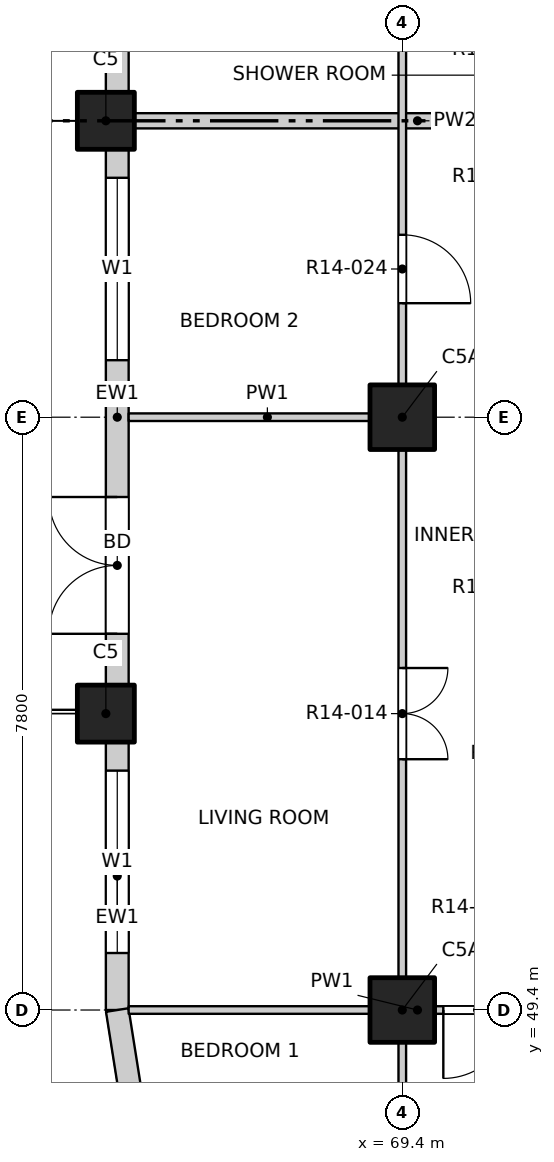
"""IFC4 building model, lengths in metres.
Left out: names, types, materials, properties, quantities, classifications, styles, units other than length and angle.
Written with IfcOpenShell. Run it as: python <this file> out.ifc"""

import sys

from ifc_helpers import new_model, si_unit, direction, frame, frame_2d, origin, origin_2d, place, context, subcontext, project, spatial, rectangle, extrude, element, fill, save


model = new_model("IFC4")
c1 = context("Model", 3, precision=1e-05, world=origin(), true_north=direction((0.0, 1.0)))
c2 = subcontext(c1, "Body", "Model", "MODEL_VIEW")
j1 = project(units=[si_unit("LENGTHUNIT", "METRE"), si_unit("PLANEANGLEUNIT", "RADIAN")], contexts=[c1])
p1 = place(None, origin())
s1 = spatial("IfcSite", under=j1, at=p1, CompositionType="ELEMENT")
p2 = place(p1, origin())
s2 = spatial("IfcBuilding", under=s1, at=p2, CompositionType="ELEMENT")
p3 = place(p2, frame((0.0, 0.0, 148.6)))
s3 = spatial("IfcBuildingStorey", under=s2, at=p3, CompositionType="ELEMENT", Elevation=148.6)
for number, where, z_axis, x_axis in (
    (1, (65.5, 53.3, -0.3), (0.0, 0.0, 1.0), (1.0, 0.0, 0.0)),
    (2, (65.5, 61.1, -0.3), (0.0, 0.0, 1.0), (1.0, 0.0, 0.0)),
):
    element("IfcColumn", number, at=place(p3, frame(where, z_axis=z_axis, x_axis=x_axis)), inside=s3, PredefinedType="COLUMN", context=c2, shape_type="SweptSolid", body=[
        extrude(rectangle(XDim=0.75, YDim=0.75, at=origin_2d()), origin(), (0.0, 0.0, 1.0), 3.45),
    ])
for number, where, z_axis, x_axis in (
    (3, (69.4, 49.4, -0.3), (0.0, 0.0, 1.0), (1.0, 0.0, 0.0)),
    (4, (69.4, 57.2, -0.3), (0.0, 0.0, 1.0), (1.0, 0.0, 0.0)),
):
    element("IfcColumn", number, at=place(p3, frame(where, z_axis=z_axis, x_axis=x_axis)), inside=s3, PredefinedType="COLUMN", context=c2, shape_type="SweptSolid", body=[
        extrude(rectangle(XDim=0.85, YDim=0.85, at=origin_2d()), origin(), (0.0, 0.0, 1.0), 3.45),
    ])
p4 = place(p3, frame((65.65, 49.4, 0.0), z_axis=(0.0, 0.0, 1.0), x_axis=(0.0, 1.0, 0.0)))
e5 = element("IfcWall", 5, at=p4, inside=s3, PredefinedType="SOLIDWALL", context=c2, shape_type="SweptSolid", body=[
    extrude(rectangle(XDim=3.525, YDim=0.3, at=frame_2d((1.763, 0.0))), origin(), (0.0, 0.0, 1.0), 2.7),
])
p5 = place(p4, frame((0.75, 0.0, 0.9)))
e6 = element("IfcOpeningElement", 6, at=p5, cuts=e5, PredefinedType="OPENING", context=c2, shape_type="SweptSolid", body=[
    extrude(rectangle(XDim=2.4, YDim=1.8, at=frame_2d((1.2, 0.9))), frame((0.0, 0.16, 0.0), z_axis=(0.0, -1.0, 0.0), x_axis=(1.0, 0.0, 0.0)), (0.0, 0.0, 1.0), 0.32),
])
p6 = place(p3, frame((65.65, 53.675, 0.0), z_axis=(0.0, 0.0, 1.0), x_axis=(0.0, 1.0, 0.0)))
e7 = element("IfcWall", 7, at=p6, inside=s3, PredefinedType="SOLIDWALL", context=c2, shape_type="SweptSolid", body=[
    extrude(rectangle(XDim=7.05, YDim=0.3, at=frame_2d((3.525, 0.0))), origin(), (0.0, 0.0, 1.0), 2.7),
])
p7 = place(p6, frame((0.675, 0.0, 0.0)))
e8 = element("IfcOpeningElement", 8, at=p7, cuts=e7, PredefinedType="OPENING", context=c2, shape_type="SweptSolid", body=[
    extrude(rectangle(XDim=1.8, YDim=2.4, at=frame_2d((0.9, 1.2))), frame((0.0, 0.16, 0.0), z_axis=(0.0, -1.0, 0.0), x_axis=(1.0, 0.0, 0.0)), (0.0, 0.0, 1.0), 0.32),
])
p8 = place(p6, frame((4.275, 0.0, 0.9)))
e9 = element("IfcOpeningElement", 9, at=p8, cuts=e7, PredefinedType="OPENING", context=c2, shape_type="SweptSolid", body=[
    extrude(rectangle(XDim=2.4, YDim=1.8, at=frame_2d((1.2, 0.9))), frame((0.0, 0.16, 0.0), z_axis=(0.0, -1.0, 0.0), x_axis=(1.0, 0.0, 0.0)), (0.0, 0.0, 1.0), 0.32),
])
p9 = place(p3, frame((65.65, 61.475, 0.0), z_axis=(0.0, 0.0, 1.0), x_axis=(0.0, 1.0, 0.0)))
e10 = element("IfcWall", 10, at=p9, inside=s3, PredefinedType="SOLIDWALL", context=c2, shape_type="SweptSolid", body=[
    extrude(rectangle(XDim=7.05, YDim=0.3, at=frame_2d((3.525, 0.0))), origin(), (0.0, 0.0, 1.0), 2.7),
])
p10 = place(p9, frame((0.675, 0.0, 0.0)))
e11 = element("IfcOpeningElement", 11, at=p10, cuts=e10, PredefinedType="OPENING", context=c2, shape_type="SweptSolid", body=[
    extrude(rectangle(XDim=1.8, YDim=2.4, at=frame_2d((0.9, 1.2))), frame((0.0, 0.16, 0.0), z_axis=(0.0, -1.0, 0.0), x_axis=(1.0, 0.0, 0.0)), (0.0, 0.0, 1.0), 0.32),
])
p11 = place(p9, frame((4.275, 0.0, 0.9)))
e12 = element("IfcOpeningElement", 12, at=p11, cuts=e10, PredefinedType="OPENING", context=c2, shape_type="SweptSolid", body=[
    extrude(rectangle(XDim=2.4, YDim=1.8, at=frame_2d((1.2, 0.9))), frame((0.0, 0.16, 0.0), z_axis=(0.0, -1.0, 0.0), x_axis=(1.0, 0.0, 0.0)), (0.0, 0.0, 1.0), 0.32),
])
p12 = place(p3, frame((65.65, 49.4, 0.0), z_axis=(0.0, 0.0, 1.0), x_axis=(0.156496880861, -0.987678452879, 0.0)))
e13 = element("IfcWall", 13, at=p12, inside=s3, PredefinedType="SOLIDWALL", context=c2, shape_type="SweptSolid", body=[
    extrude(rectangle(XDim=1.173, YDim=0.3, at=frame_2d((0.586, 0.0))), origin(), (0.0, 0.0, 1.0), 2.7),
])
p13 = place(p3, frame((65.8, 49.4, 0.0), z_axis=(0.0, 0.0, 1.0), x_axis=(1.0, 0.0, 0.0)))
e14 = element("IfcWall", 14, at=p13, inside=s3, PredefinedType="PARTITIONING", context=c2, shape_type="SweptSolid", body=[
    extrude(rectangle(XDim=7.6, YDim=0.1, at=frame_2d((3.8, 0.0))), origin(), (0.0, 0.0, 1.0), 3.15),
])
p14 = place(p13, frame((4.14, 0.0, 0.0)))
e15 = element("IfcOpeningElement", 15, at=p14, cuts=e14, PredefinedType="OPENING", context=c2, shape_type="SweptSolid", body=[
    extrude(rectangle(XDim=0.9, YDim=2.1, at=frame_2d((0.45, 1.05))), frame((0.0, 0.06, 0.0), z_axis=(0.0, -1.0, 0.0), x_axis=(1.0, 0.0, 0.0)), (0.0, 0.0, 1.0), 0.12),
])
p15 = place(p3, frame((65.8, 57.2, 0.0), z_axis=(0.0, 0.0, 1.0), x_axis=(1.0, 0.0, 0.0)))
e16 = element("IfcWall", 16, at=p15, inside=s3, PredefinedType="PARTITIONING", context=c2, shape_type="SweptSolid", body=[
    extrude(rectangle(XDim=3.65, YDim=0.1, at=frame_2d((1.825, 0.0))), origin(), (0.0, 0.0, 1.0), 3.15),
])
p16 = place(p3, frame((65.8, 61.1, 0.0), z_axis=(0.0, 0.0, 1.0), x_axis=(1.0, 0.0, 0.0)))
e17 = element("IfcWall", 17, at=p16, inside=s3, PredefinedType="PARTITIONING", context=c2, shape_type="SweptSolid", body=[
    extrude(rectangle(XDim=7.6, YDim=0.2, at=frame_2d((3.8, 0.0))), origin(), (0.0, 0.0, 1.0), 2.55),
])
p17 = place(p3, frame((69.4, 45.8, 0.0), z_axis=(0.0, 0.0, 1.0), x_axis=(0.0, 1.0, 0.0)))
e18 = element("IfcWall", 18, at=p17, inside=s3, PredefinedType="PARTITIONING", context=c2, shape_type="SweptSolid", body=[
    extrude(rectangle(XDim=38.4, YDim=0.1, at=frame_2d((19.2, 0.0))), origin(), (0.0, 0.0, 1.0), 3.15),
])
p18 = place(p17, frame((1.05, 0.0, 0.0)))
e19 = element("IfcOpeningElement", 19, at=p18, cuts=e18, PredefinedType="OPENING", context=c2, shape_type="SweptSolid", body=[
    extrude(rectangle(XDim=1.2, YDim=2.1, at=frame_2d((0.6, 1.05))), frame((0.0, 0.06, 0.0), z_axis=(0.0, -1.0, 0.0), x_axis=(1.0, 0.0, 0.0)), (0.0, 0.0, 1.0), 0.12),
])
p19 = place(p17, frame((6.9, 0.0, 0.0)))
e20 = element("IfcOpeningElement", 20, at=p19, cuts=e18, PredefinedType="OPENING", context=c2, shape_type="SweptSolid", body=[
    extrude(rectangle(XDim=1.2, YDim=2.1, at=frame_2d((0.6, 1.05))), frame((0.0, 0.06, 0.0), z_axis=(0.0, -1.0, 0.0), x_axis=(1.0, 0.0, 0.0)), (0.0, 0.0, 1.0), 0.12),
])
p20 = place(p17, frame((12.9, 0.0, 0.0)))
e21 = element("IfcOpeningElement", 21, at=p20, cuts=e18, PredefinedType="OPENING", context=c2, shape_type="SweptSolid", body=[
    extrude(rectangle(XDim=0.9, YDim=2.1, at=frame_2d((0.45, 1.05))), frame((0.0, 0.06, 0.0), z_axis=(0.0, -1.0, 0.0), x_axis=(1.0, 0.0, 0.0)), (0.0, 0.0, 1.0), 0.12),
])
p21 = place(p17, frame((16.8, 0.0, 0.0)))
e22 = element("IfcOpeningElement", 22, at=p21, cuts=e18, PredefinedType="OPENING", context=c2, shape_type="SweptSolid", body=[
    extrude(rectangle(XDim=0.9, YDim=2.1, at=frame_2d((0.45, 1.05))), frame((0.0, 0.06, 0.0), z_axis=(0.0, -1.0, 0.0), x_axis=(1.0, 0.0, 0.0)), (0.0, 0.0, 1.0), 0.12),
])
p22 = place(p17, frame((20.7, 0.0, 0.0)))
e23 = element("IfcOpeningElement", 23, at=p22, cuts=e18, PredefinedType="OPENING", context=c2, shape_type="SweptSolid", body=[
    extrude(rectangle(XDim=0.9, YDim=2.1, at=frame_2d((0.45, 1.05))), frame((0.0, 0.06, 0.0), z_axis=(0.0, -1.0, 0.0), x_axis=(1.0, 0.0, 0.0)), (0.0, 0.0, 1.0), 0.12),
])
p23 = place(p17, frame((24.6, 0.0, 0.0)))
e24 = element("IfcOpeningElement", 24, at=p23, cuts=e18, PredefinedType="OPENING", context=c2, shape_type="SweptSolid", body=[
    extrude(rectangle(XDim=0.9, YDim=2.1, at=frame_2d((0.45, 1.05))), frame((0.0, 0.06, 0.0), z_axis=(0.0, -1.0, 0.0), x_axis=(1.0, 0.0, 0.0)), (0.0, 0.0, 1.0), 0.12),
])
p24 = place(p17, frame((28.5, 0.0, 0.0)))
e25 = element("IfcOpeningElement", 25, at=p24, cuts=e18, PredefinedType="OPENING", context=c2, shape_type="SweptSolid", body=[
    extrude(rectangle(XDim=0.9, YDim=2.1, at=frame_2d((0.45, 1.05))), frame((0.0, 0.06, 0.0), z_axis=(0.0, -1.0, 0.0), x_axis=(1.0, 0.0, 0.0)), (0.0, 0.0, 1.0), 0.12),
])
p25 = place(p17, frame((32.4, 0.0, 0.0)))
e26 = element("IfcOpeningElement", 26, at=p25, cuts=e18, PredefinedType="OPENING", context=c2, shape_type="SweptSolid", body=[
    extrude(rectangle(XDim=0.9, YDim=2.1, at=frame_2d((0.45, 1.05))), frame((0.0, 0.06, 0.0), z_axis=(0.0, -1.0, 0.0), x_axis=(1.0, 0.0, 0.0)), (0.0, 0.0, 1.0), 0.12),
])
p26 = place(p17, frame((36.15, 0.0, 0.0)))
e27 = element("IfcOpeningElement", 27, at=p26, cuts=e18, PredefinedType="OPENING", context=c2, shape_type="SweptSolid", body=[
    extrude(rectangle(XDim=1.2, YDim=2.1, at=frame_2d((0.6, 1.05))), frame((0.0, 0.06, 0.0), z_axis=(0.0, -1.0, 0.0), x_axis=(1.0, 0.0, 0.0)), (0.0, 0.0, 1.0), 0.12),
])
p27 = place(p5, origin())
e28 = element("IfcWindow", 28, at=p27, inside=s3, PartitioningType="DOUBLE_PANEL_VERTICAL", PredefinedType="WINDOW", context=c2, shape_type="SweptSolid", body=[
    extrude(rectangle(XDim=2.4, YDim=1.8, at=frame_2d((1.2, 0.9))), frame((0.0, 0.03, 0.0), z_axis=(0.0, -1.0, 0.0), x_axis=(1.0, 0.0, 0.0)), (0.0, 0.0, 1.0), 0.06),
])
fill(e6, e28)
p28 = place(p7, origin())
e29 = element("IfcDoor", 29, at=p28, inside=s3, OperationType="DOUBLE_DOOR_SINGLE_SWING", PredefinedType="DOOR", context=c2, shape_type="SweptSolid", body=[
    extrude(rectangle(XDim=1.8, YDim=2.4, at=frame_2d((0.9, 1.2))), frame((0.0, 0.025, 0.0), z_axis=(0.0, -1.0, 0.0), x_axis=(1.0, 0.0, 0.0)), (0.0, 0.0, 1.0), 0.05),
])
fill(e8, e29)
p29 = place(p8, origin())
e30 = element("IfcWindow", 30, at=p29, inside=s3, PartitioningType="DOUBLE_PANEL_VERTICAL", PredefinedType="WINDOW", context=c2, shape_type="SweptSolid", body=[
    extrude(rectangle(XDim=2.4, YDim=1.8, at=frame_2d((1.2, 0.9))), frame((0.0, 0.03, 0.0), z_axis=(0.0, -1.0, 0.0), x_axis=(1.0, 0.0, 0.0)), (0.0, 0.0, 1.0), 0.06),
])
fill(e9, e30)
p30 = place(p14, origin())
e31 = element("IfcDoor", 31, at=p30, inside=s3, OperationType="SINGLE_SWING_RIGHT", PredefinedType="DOOR", context=c2, shape_type="SweptSolid", body=[
    extrude(rectangle(XDim=0.9, YDim=2.1, at=frame_2d((0.45, 1.05))), frame((0.0, 0.025, 0.0), z_axis=(0.0, -1.0, 0.0), x_axis=(1.0, 0.0, 0.0)), (0.0, 0.0, 1.0), 0.05),
])
fill(e15, e31)
p31 = place(p19, origin())
e32 = element("IfcDoor", 32, at=p31, inside=s3, OperationType="DOUBLE_DOOR_SINGLE_SWING", PredefinedType="DOOR", context=c2, shape_type="SweptSolid", body=[
    extrude(rectangle(XDim=1.2, YDim=2.1, at=frame_2d((0.6, 1.05))), frame((0.0, 0.025, 0.0), z_axis=(0.0, -1.0, 0.0), x_axis=(1.0, 0.0, 0.0)), (0.0, 0.0, 1.0), 0.05),
])
fill(e20, e32)
p32 = place(p20, origin())
e33 = element("IfcDoor", 33, at=p32, inside=s3, OperationType="SINGLE_SWING_RIGHT", PredefinedType="DOOR", context=c2, shape_type="SweptSolid", body=[
    extrude(rectangle(XDim=0.9, YDim=2.1, at=frame_2d((0.45, 1.05))), frame((0.0, 0.025, 0.0), z_axis=(0.0, -1.0, 0.0), x_axis=(1.0, 0.0, 0.0)), (0.0, 0.0, 1.0), 0.05),
])
fill(e21, e33)
save(model, sys.argv[1])
